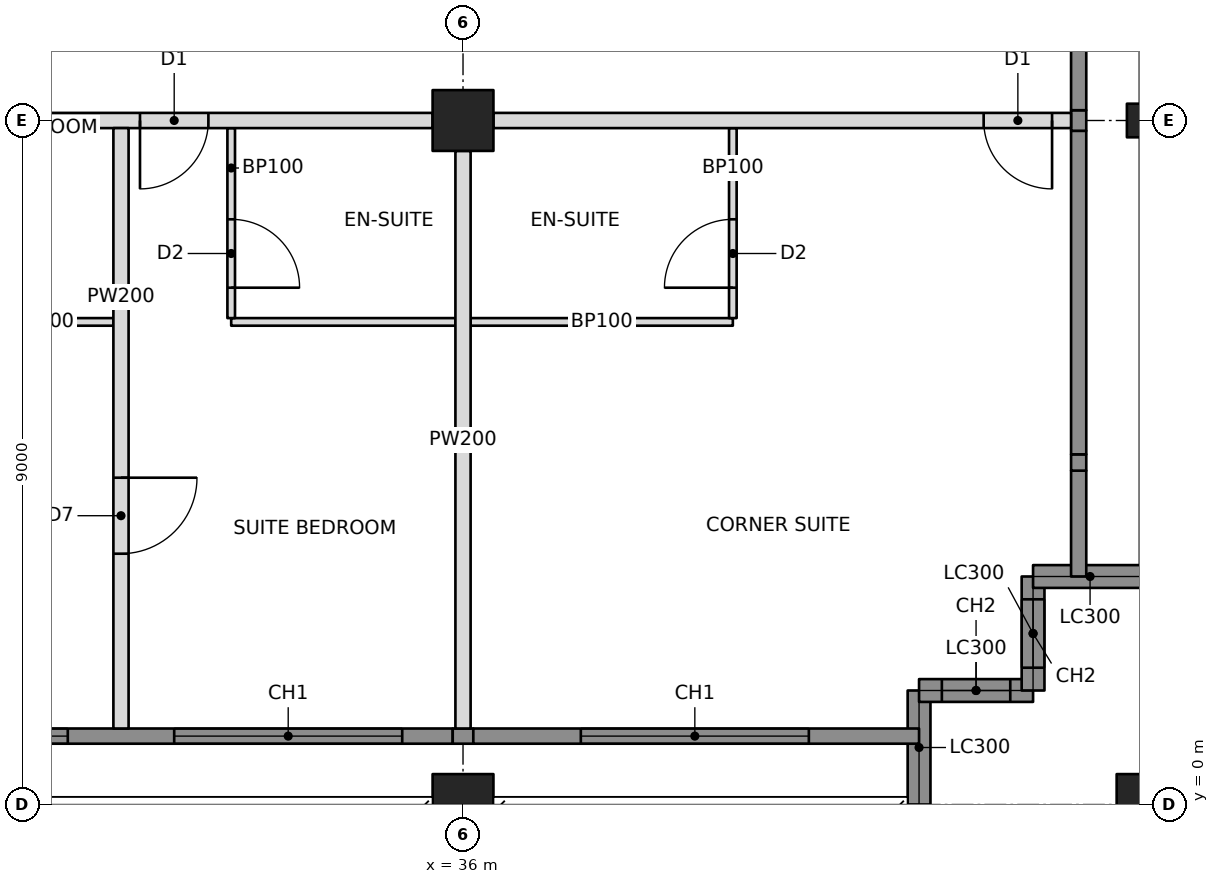
"""IFC4 building model, lengths in metres.
Left out: names, types, materials, properties, quantities, classifications, styles, units other than length and angle.
Written with IfcOpenShell. Run it as: python <this file> out.ifc"""

import sys

from ifc_helpers import new_model, si_unit, direction, frame, frame_2d, origin, origin_2d, place, context, subcontext, project, spatial, rectangle, hollow_rectangle, i_section, extrude, element, fill, save


model = new_model("IFC4")
c1 = context("Model", 3, precision=1e-05, world=origin(), true_north=direction((0.0, 1.0)))
c2 = subcontext(c1, "Body", "Model", "MODEL_VIEW")
j1 = project(units=[si_unit("LENGTHUNIT", "METRE"), si_unit("PLANEANGLEUNIT", "RADIAN")], contexts=[c1])
p1 = place(None, origin())
s1 = spatial("IfcSite", under=j1, at=p1, CompositionType="ELEMENT")
p2 = place(p1, origin())
s2 = spatial("IfcBuilding", under=s1, at=p2, CompositionType="ELEMENT")
p3 = place(p2, frame((0.0, 0.0, 148.6)))
s3 = spatial("IfcBuildingStorey", under=s2, at=p3, CompositionType="ELEMENT", Elevation=148.6)
p4 = place(p3, frame((36.0, 0.0, 0.0), z_axis=(0.0, 0.0, 1.0), x_axis=(1.0, 0.0, 0.0)))
e1 = element("IfcColumn", 1, at=p4, inside=s3, PredefinedType="COLUMN", context=c2, shape_type="SweptSolid", body=[
    extrude(hollow_rectangle(XDim=0.8, YDim=0.8, WallThickness=0.06, at=origin_2d()), origin(), (0.0, 0.0, 1.0), 3.4),
])
p5 = place(p3, frame((36.0, 9.0, 0.0), z_axis=(0.0, 0.0, 1.0), x_axis=(0.0, 1.0, 0.0)))
e2 = element("IfcColumn", 2, at=p5, inside=s3, PredefinedType="COLUMN", context=c2, shape_type="SweptSolid", body=[
    extrude(hollow_rectangle(XDim=0.8, YDim=0.8, WallThickness=0.07, at=origin_2d()), origin(), (0.0, 0.0, 1.0), 3.4),
])
p6 = place(p3, frame((45.0, 0.0, 0.0), z_axis=(0.0, 0.0, 1.0), x_axis=(1.0, 0.0, 0.0)))
e3 = element("IfcColumn", 3, at=p6, inside=s3, PredefinedType="COLUMN", context=c2, shape_type="SweptSolid", body=[
    extrude(hollow_rectangle(XDim=0.8, YDim=0.8, WallThickness=0.06, at=origin_2d()), origin(), (0.0, 0.0, 1.0), 3.4),
])
p7 = place(p3, frame((45.0, 9.0, 0.0), z_axis=(0.0, 0.0, 1.0), x_axis=(0.0, 1.0, 0.0)))
e4 = element("IfcColumn", 4, at=p7, inside=s3, PredefinedType="COLUMN", context=c2, shape_type="SweptSolid", body=[
    extrude(i_section(OverallWidth=0.442, OverallDepth=0.531, WebThickness=0.066, FlangeThickness=0.106, at=origin_2d()), origin(), (0.0, 0.0, 1.0), 3.4),
])
p8 = place(p3, frame((42.0, 0.0, 0.0), z_axis=(0.0, 0.0, 1.0), x_axis=(0.0, 1.0, 0.0)))
e5 = element("IfcWall", 5, at=p8, inside=s3, PredefinedType="SOLIDWALL", context=c2, shape_type="SweptSolid", body=[
    extrude(rectangle(XDim=1.5, YDim=0.3, at=frame_2d((0.75, 0.0))), origin(), (0.0, 0.0, 1.0), 2.42),
])
p9 = place(p3, frame((42.0, 1.5, 0.0), z_axis=(0.0, 0.0, 1.0), x_axis=(1.0, 0.0, 0.0)))
e6 = element("IfcWall", 6, at=p9, inside=s3, PredefinedType="SOLIDWALL", context=c2, shape_type="SweptSolid", body=[
    extrude(rectangle(XDim=1.5, YDim=0.3, at=frame_2d((0.75, 0.0))), origin(), (0.0, 0.0, 1.0), 3.2),
])
p10 = place(p9, frame((0.3, 0.0, 0.6)))
e7 = element("IfcOpeningElement", 7, at=p10, cuts=e6, PredefinedType="OPENING", context=c2, shape_type="SweptSolid", body=[
    extrude(rectangle(XDim=0.9, YDim=2.2, at=frame_2d((0.45, 1.1))), frame((0.0, 0.16, 0.0), z_axis=(0.0, -1.0, 0.0), x_axis=(1.0, 0.0, 0.0)), (0.0, 0.0, 1.0), 0.32),
])
p11 = place(p3, frame((43.5, 1.5, 0.0), z_axis=(0.0, 0.0, 1.0), x_axis=(0.0, 1.0, 0.0)))
e8 = element("IfcWall", 8, at=p11, inside=s3, PredefinedType="SOLIDWALL", context=c2, shape_type="SweptSolid", body=[
    extrude(rectangle(XDim=1.5, YDim=0.3, at=frame_2d((0.75, 0.0))), origin(), (0.0, 0.0, 1.0), 3.2),
])
p12 = place(p11, frame((0.3, 0.0, 0.6)))
e9 = element("IfcOpeningElement", 9, at=p12, cuts=e8, PredefinedType="OPENING", context=c2, shape_type="SweptSolid", body=[
    extrude(rectangle(XDim=0.9, YDim=2.2, at=frame_2d((0.45, 1.1))), frame((0.0, 0.16, 0.0), z_axis=(0.0, -1.0, 0.0), x_axis=(1.0, 0.0, 0.0)), (0.0, 0.0, 1.0), 0.32),
])
p13 = place(p3, frame((43.5, 3.0, 0.0), z_axis=(0.0, 0.0, 1.0), x_axis=(1.0, 0.0, 0.0)))
e10 = element("IfcWall", 10, at=p13, inside=s3, PredefinedType="SOLIDWALL", context=c2, shape_type="SweptSolid", body=[
    extrude(rectangle(XDim=1.5, YDim=0.3, at=frame_2d((0.75, 0.0))), origin(), (0.0, 0.0, 1.0), 2.42),
])
p14 = place(p3, frame((44.1, 3.0, 0.0), z_axis=(0.0, 0.0, 1.0), x_axis=(0.0, 1.0, 0.0)))
e11 = element("IfcWall", 11, at=p14, inside=s3, PredefinedType="SOLIDWALL", context=c2, shape_type="SweptSolid", body=[
    extrude(rectangle(XDim=1.393, YDim=0.2, at=frame_2d((0.696, 0.0))), origin(), (0.0, 0.0, 1.0), 3.2),
])
p15 = place(p3, frame((27.4, 9.0, 0.0), z_axis=(0.0, 0.0, 1.0), x_axis=(1.0, 0.0, 0.0)))
e12 = element("IfcWall", 12, at=p15, inside=s3, PredefinedType="PARTITIONING", context=c2, shape_type="SweptSolid", body=[
    extrude(rectangle(XDim=8.2, YDim=0.2, at=frame_2d((4.1, 0.0))), origin(), (0.0, 0.0, 1.0), 2.405),
])
p16 = place(p15, frame((4.35, 0.0, 0.0)))
e13 = element("IfcOpeningElement", 13, at=p16, cuts=e12, PredefinedType="OPENING", context=c2, shape_type="SweptSolid", body=[
    extrude(rectangle(XDim=0.9, YDim=2.1, at=frame_2d((0.45, 1.05))), frame((0.0, 0.11, 0.0), z_axis=(0.0, -1.0, 0.0), x_axis=(1.0, 0.0, 0.0)), (0.0, 0.0, 1.0), 0.22),
])
p17 = place(p3, frame((36.4, 9.0, 0.0), z_axis=(0.0, 0.0, 1.0), x_axis=(1.0, 0.0, 0.0)))
e14 = element("IfcWall", 14, at=p17, inside=s3, PredefinedType="PARTITIONING", context=c2, shape_type="SweptSolid", body=[
    extrude(rectangle(XDim=7.6, YDim=0.2, at=frame_2d((3.8, 0.0))), origin(), (0.0, 0.0, 1.0), 2.438),
])
p18 = place(p17, frame((6.45, 0.0, 0.0)))
e15 = element("IfcOpeningElement", 15, at=p18, cuts=e14, PredefinedType="OPENING", context=c2, shape_type="SweptSolid", body=[
    extrude(rectangle(XDim=0.9, YDim=2.1, at=frame_2d((0.45, 1.05))), frame((0.0, 0.11, 0.0), z_axis=(0.0, -1.0, 0.0), x_axis=(1.0, 0.0, 0.0)), (0.0, 0.0, 1.0), 0.22),
])
p19 = place(p3, frame((31.5, 8.9, 0.0), z_axis=(0.0, 0.0, 1.0), x_axis=(0.0, -1.0, 0.0)))
e16 = element("IfcWall", 16, at=p19, inside=s3, PredefinedType="PARTITIONING", context=c2, shape_type="SweptSolid", body=[
    extrude(rectangle(XDim=7.9, YDim=0.2, at=frame_2d((3.95, 0.0))), origin(), (0.0, 0.0, 1.0), 2.404),
])
p20 = place(p19, frame((4.6, 0.0, 0.0)))
e17 = element("IfcOpeningElement", 17, at=p20, cuts=e16, PredefinedType="OPENING", context=c2, shape_type="SweptSolid", body=[
    extrude(rectangle(XDim=1.0, YDim=2.1, at=frame_2d((0.5, 1.05))), frame((0.0, 0.11, 0.0), z_axis=(0.0, -1.0, 0.0), x_axis=(1.0, 0.0, 0.0)), (0.0, 0.0, 1.0), 0.22),
])
p21 = place(p3, frame((36.0, 8.6, 0.0), z_axis=(0.0, 0.0, 1.0), x_axis=(0.0, -1.0, 0.0)))
e18 = element("IfcWall", 18, at=p21, inside=s3, PredefinedType="PARTITIONING", context=c2, shape_type="SweptSolid", body=[
    extrude(rectangle(XDim=7.6, YDim=0.2, at=frame_2d((3.8, 0.0))), origin(), (0.0, 0.0, 1.0), 2.438),
])
p22 = place(p3, frame((29.55, 6.35, 0.0), z_axis=(0.0, 0.0, 1.0), x_axis=(1.0, 0.0, 0.0)))
e19 = element("IfcWall", 19, at=p22, inside=s3, PredefinedType="PARTITIONING", context=c2, shape_type="SweptSolid", body=[
    extrude(rectangle(XDim=1.85, YDim=0.1, at=frame_2d((0.925, 0.0))), origin(), (0.0, 0.0, 1.0), 3.2),
])
p23 = place(p3, frame((32.95, 6.35, 0.0), z_axis=(0.0, 0.0, 1.0), x_axis=(1.0, 0.0, 0.0)))
e20 = element("IfcWall", 20, at=p23, inside=s3, PredefinedType="PARTITIONING", context=c2, shape_type="SweptSolid", body=[
    extrude(rectangle(XDim=2.95, YDim=0.1, at=frame_2d((1.475, 0.0))), origin(), (0.0, 0.0, 1.0), 2.438),
])
p24 = place(p3, frame((32.95, 8.9, 0.0), z_axis=(0.0, 0.0, 1.0), x_axis=(0.0, -1.0, 0.0)))
e21 = element("IfcWall", 21, at=p24, inside=s3, PredefinedType="PARTITIONING", context=c2, shape_type="SweptSolid", body=[
    extrude(rectangle(XDim=2.5, YDim=0.1, at=frame_2d((1.25, 0.0))), origin(), (0.0, 0.0, 1.0), 2.404),
])
p25 = place(p24, frame((1.2, 0.0, 0.0)))
e22 = element("IfcOpeningElement", 22, at=p25, cuts=e21, PredefinedType="OPENING", context=c2, shape_type="SweptSolid", body=[
    extrude(rectangle(XDim=0.9, YDim=2.1, at=frame_2d((0.45, 1.05))), frame((0.0, 0.06, 0.0), z_axis=(0.0, -1.0, 0.0), x_axis=(1.0, 0.0, 0.0)), (0.0, 0.0, 1.0), 0.12),
])
p26 = place(p3, frame((36.1, 6.35, 0.0), z_axis=(0.0, 0.0, 1.0), x_axis=(1.0, 0.0, 0.0)))
e23 = element("IfcWall", 23, at=p26, inside=s3, PredefinedType="PARTITIONING", context=c2, shape_type="SweptSolid", body=[
    extrude(rectangle(XDim=3.45, YDim=0.1, at=frame_2d((1.725, 0.0))), origin(), (0.0, 0.0, 1.0), 2.438),
])
p27 = place(p3, frame((39.55, 8.9, 0.0), z_axis=(0.0, 0.0, 1.0), x_axis=(0.0, -1.0, 0.0)))
e24 = element("IfcWall", 24, at=p27, inside=s3, PredefinedType="PARTITIONING", context=c2, shape_type="SweptSolid", body=[
    extrude(rectangle(XDim=2.5, YDim=0.1, at=frame_2d((1.25, 0.0))), origin(), (0.0, 0.0, 1.0), 2.438),
])
p28 = place(p27, frame((1.2, 0.0, 0.0)))
e25 = element("IfcOpeningElement", 25, at=p28, cuts=e24, PredefinedType="OPENING", context=c2, shape_type="SweptSolid", body=[
    extrude(rectangle(XDim=0.9, YDim=2.1, at=frame_2d((0.45, 1.05))), frame((0.0, 0.06, 0.0), z_axis=(0.0, -1.0, 0.0), x_axis=(1.0, 0.0, 0.0)), (0.0, 0.0, 1.0), 0.12),
])
p29 = place(p3, frame((27.194, 0.9, 0.0), z_axis=(0.0, 0.0, 1.0), x_axis=(1.0, 0.0, 0.0)))
e26 = element("IfcWall", 26, at=p29, inside=s3, PredefinedType="SOLIDWALL", context=c2, shape_type="SweptSolid", body=[
    extrude(rectangle(XDim=8.671, YDim=0.2, at=frame_2d((4.335, 0.0))), origin(), (0.0, 0.0, 1.0), 3.2),
])
p30 = place(p29, frame((0.606, 0.0, 0.6)))
e27 = element("IfcOpeningElement", 27, at=p30, cuts=e26, PredefinedType="OPENING", context=c2, shape_type="SweptSolid", body=[
    extrude(rectangle(XDim=3.0, YDim=2.2, at=frame_2d((1.5, 1.1))), frame((0.0, 0.11, 0.0), z_axis=(0.0, -1.0, 0.0), x_axis=(1.0, 0.0, 0.0)), (0.0, 0.0, 1.0), 0.22),
])
p31 = place(p29, frame((5.006, 0.0, 0.6)))
e28 = element("IfcOpeningElement", 28, at=p31, cuts=e26, PredefinedType="OPENING", context=c2, shape_type="SweptSolid", body=[
    extrude(rectangle(XDim=3.0, YDim=2.2, at=frame_2d((1.5, 1.1))), frame((0.0, 0.11, 0.0), z_axis=(0.0, -1.0, 0.0), x_axis=(1.0, 0.0, 0.0)), (0.0, 0.0, 1.0), 0.22),
])
p32 = place(p3, frame((35.865, 0.9, 0.0), z_axis=(0.0, 0.0, 1.0), x_axis=(1.0, 0.0, 0.0)))
e29 = element("IfcWall", 29, at=p32, inside=s3, PredefinedType="SOLIDWALL", context=c2, shape_type="SweptSolid", body=[
    extrude(rectangle(XDim=0.271, YDim=0.2, at=frame_2d((0.135, 0.0))), origin(), (0.0, 0.0, 1.0), 2.438),
])
p33 = place(p3, frame((36.135, 0.9, 0.0), z_axis=(0.0, 0.0, 1.0), x_axis=(1.0, 0.0, 0.0)))
e30 = element("IfcWall", 30, at=p33, inside=s3, PredefinedType="SOLIDWALL", context=c2, shape_type="SweptSolid", body=[
    extrude(rectangle(XDim=5.865, YDim=0.2, at=frame_2d((2.932, 0.0))), origin(), (0.0, 0.0, 1.0), 3.2),
])
p34 = place(p33, frame((1.415, 0.0, 0.6)))
e31 = element("IfcOpeningElement", 31, at=p34, cuts=e30, PredefinedType="OPENING", context=c2, shape_type="SweptSolid", body=[
    extrude(rectangle(XDim=3.0, YDim=2.2, at=frame_2d((1.5, 1.1))), frame((0.0, 0.11, 0.0), z_axis=(0.0, -1.0, 0.0), x_axis=(1.0, 0.0, 0.0)), (0.0, 0.0, 1.0), 0.22),
])
p35 = place(p3, frame((44.1, 4.393, 0.0), z_axis=(0.0, 0.0, 1.0), x_axis=(0.0, 1.0, 0.0)))
e32 = element("IfcWall", 32, at=p35, inside=s3, PredefinedType="SOLIDWALL", context=c2, shape_type="SweptSolid", body=[
    extrude(rectangle(XDim=0.215, YDim=0.2, at=frame_2d((0.107, 0.0))), origin(), (0.0, 0.0, 1.0), 2.661),
])
p36 = place(p3, frame((44.1, 4.607, 0.0), z_axis=(0.0, 0.0, 1.0), x_axis=(0.0, 1.0, 0.0)))
e33 = element("IfcWall", 33, at=p36, inside=s3, PredefinedType="SOLIDWALL", context=c2, shape_type="SweptSolid", body=[
    extrude(rectangle(XDim=4.257, YDim=0.2, at=frame_2d((2.129, 0.0))), origin(), (0.0, 0.0, 1.0), 3.2),
])
p37 = place(p3, frame((44.1, 8.865, 0.0), z_axis=(0.0, 0.0, 1.0), x_axis=(0.0, 1.0, 0.0)))
e34 = element("IfcWall", 34, at=p37, inside=s3, PredefinedType="SOLIDWALL", context=c2, shape_type="SweptSolid", body=[
    extrude(rectangle(XDim=0.271, YDim=0.2, at=frame_2d((0.135, 0.0))), origin(), (0.0, 0.0, 1.0), 2.438),
])
p38 = place(p3, frame((44.1, 9.135, 0.0), z_axis=(0.0, 0.0, 1.0), x_axis=(0.0, 1.0, 0.0)))
e35 = element("IfcWall", 35, at=p38, inside=s3, PredefinedType="SOLIDWALL", context=c2, shape_type="SweptSolid", body=[
    extrude(rectangle(XDim=8.671, YDim=0.2, at=frame_2d((4.335, 0.0))), origin(), (0.0, 0.0, 1.0), 3.2),
])
p39 = place(p38, frame((2.015, 0.0, 0.6)))
e36 = element("IfcOpeningElement", 36, at=p39, cuts=e35, PredefinedType="OPENING", context=c2, shape_type="SweptSolid", body=[
    extrude(rectangle(XDim=3.0, YDim=2.2, at=frame_2d((1.5, 1.1))), frame((0.0, 0.11, 0.0), z_axis=(0.0, -1.0, 0.0), x_axis=(1.0, 0.0, 0.0)), (0.0, 0.0, 1.0), 0.22),
])
p40 = place(p38, frame((5.515, 0.0, 0.6)))
e37 = element("IfcOpeningElement", 37, at=p40, cuts=e35, PredefinedType="OPENING", context=c2, shape_type="SweptSolid", body=[
    extrude(rectangle(XDim=3.0, YDim=2.2, at=frame_2d((1.5, 1.1))), frame((0.0, 0.11, 0.0), z_axis=(0.0, -1.0, 0.0), x_axis=(1.0, 0.0, 0.0)), (0.0, 0.0, 1.0), 0.22),
])
p41 = place(p10, origin())
e38 = element("IfcWindow", 38, at=p41, inside=s3, PartitioningType="SINGLE_PANEL", PredefinedType="WINDOW", context=c2, shape_type="SweptSolid", body=[
    extrude(rectangle(XDim=0.9, YDim=2.2, at=frame_2d((0.45, 1.1))), frame((0.0, 0.03, 0.0), z_axis=(0.0, -1.0, 0.0), x_axis=(1.0, 0.0, 0.0)), (0.0, 0.0, 1.0), 0.06),
])
fill(e7, e38)
p42 = place(p12, origin())
e39 = element("IfcWindow", 39, at=p42, inside=s3, PartitioningType="SINGLE_PANEL", PredefinedType="WINDOW", context=c2, shape_type="SweptSolid", body=[
    extrude(rectangle(XDim=0.9, YDim=2.2, at=frame_2d((0.45, 1.1))), frame((0.0, 0.03, 0.0), z_axis=(0.0, -1.0, 0.0), x_axis=(1.0, 0.0, 0.0)), (0.0, 0.0, 1.0), 0.06),
])
fill(e9, e39)
p43 = place(p30, origin())
e40 = element("IfcWindow", 40, at=p43, inside=s3, PartitioningType="TRIPLE_PANEL_VERTICAL", PredefinedType="WINDOW", context=c2, shape_type="SweptSolid", body=[
    extrude(rectangle(XDim=3.0, YDim=2.2, at=frame_2d((1.5, 1.1))), frame((0.0, 0.03, 0.0), z_axis=(0.0, -1.0, 0.0), x_axis=(1.0, 0.0, 0.0)), (0.0, 0.0, 1.0), 0.06),
])
fill(e27, e40)
p44 = place(p31, origin())
e41 = element("IfcWindow", 41, at=p44, inside=s3, PartitioningType="TRIPLE_PANEL_VERTICAL", PredefinedType="WINDOW", context=c2, shape_type="SweptSolid", body=[
    extrude(rectangle(XDim=3.0, YDim=2.2, at=frame_2d((1.5, 1.1))), frame((0.0, 0.03, 0.0), z_axis=(0.0, -1.0, 0.0), x_axis=(1.0, 0.0, 0.0)), (0.0, 0.0, 1.0), 0.06),
])
fill(e28, e41)
p45 = place(p34, origin())
e42 = element("IfcWindow", 42, at=p45, inside=s3, PartitioningType="TRIPLE_PANEL_VERTICAL", PredefinedType="WINDOW", context=c2, shape_type="SweptSolid", body=[
    extrude(rectangle(XDim=3.0, YDim=2.2, at=frame_2d((1.5, 1.1))), frame((0.0, 0.03, 0.0), z_axis=(0.0, -1.0, 0.0), x_axis=(1.0, 0.0, 0.0)), (0.0, 0.0, 1.0), 0.06),
])
fill(e31, e42)
p46 = place(p20, origin())
e43 = element("IfcDoor", 43, at=p46, inside=s3, OperationType="SINGLE_SWING_LEFT", PredefinedType="DOOR", context=c2, shape_type="SweptSolid", body=[
    extrude(rectangle(XDim=1.0, YDim=2.1, at=frame_2d((0.5, 1.05))), frame((0.0, 0.025, 0.0), z_axis=(0.0, -1.0, 0.0), x_axis=(1.0, 0.0, 0.0)), (0.0, 0.0, 1.0), 0.05),
])
fill(e17, e43)
p47 = place(p25, origin())
e44 = element("IfcDoor", 44, at=p47, inside=s3, OperationType="SINGLE_SWING_RIGHT", PredefinedType="DOOR", context=c2, shape_type="SweptSolid", body=[
    extrude(rectangle(XDim=0.9, YDim=2.1, at=frame_2d((0.45, 1.05))), frame((0.0, 0.025, 0.0), z_axis=(0.0, -1.0, 0.0), x_axis=(1.0, 0.0, 0.0)), (0.0, 0.0, 1.0), 0.05),
])
fill(e22, e44)
p48 = place(p16, frame((0.9, 0.0, 0.0), z_axis=(0.0, 0.0, 1.0), x_axis=(-1.0, 0.0, 0.0)))
e45 = element("IfcDoor", 45, at=p48, inside=s3, OperationType="SINGLE_SWING_RIGHT", PredefinedType="DOOR", context=c2, shape_type="SweptSolid", body=[
    extrude(rectangle(XDim=0.9, YDim=2.1, at=frame_2d((0.45, 1.05))), frame((0.0, 0.025, 0.0), z_axis=(0.0, -1.0, 0.0), x_axis=(1.0, 0.0, 0.0)), (0.0, 0.0, 1.0), 0.05),
])
fill(e13, e45)
p49 = place(p28, frame((0.9, 0.0, 0.0), z_axis=(0.0, 0.0, 1.0), x_axis=(-1.0, 0.0, 0.0)))
e46 = element("IfcDoor", 46, at=p49, inside=s3, OperationType="SINGLE_SWING_LEFT", PredefinedType="DOOR", context=c2, shape_type="SweptSolid", body=[
    extrude(rectangle(XDim=0.9, YDim=2.1, at=frame_2d((0.45, 1.05))), frame((0.0, 0.025, 0.0), z_axis=(0.0, -1.0, 0.0), x_axis=(1.0, 0.0, 0.0)), (0.0, 0.0, 1.0), 0.05),
])
fill(e25, e46)
p50 = place(p18, frame((0.9, 0.0, 0.0), z_axis=(0.0, 0.0, 1.0), x_axis=(-1.0, 0.0, 0.0)))
e47 = element("IfcDoor", 47, at=p50, inside=s3, OperationType="SINGLE_SWING_LEFT", PredefinedType="DOOR", context=c2, shape_type="SweptSolid", body=[
    extrude(rectangle(XDim=0.9, YDim=2.1, at=frame_2d((0.45, 1.05))), frame((0.0, 0.025, 0.0), z_axis=(0.0, -1.0, 0.0), x_axis=(1.0, 0.0, 0.0)), (0.0, 0.0, 1.0), 0.05),
])
fill(e15, e47)
save(model, sys.argv[1])
